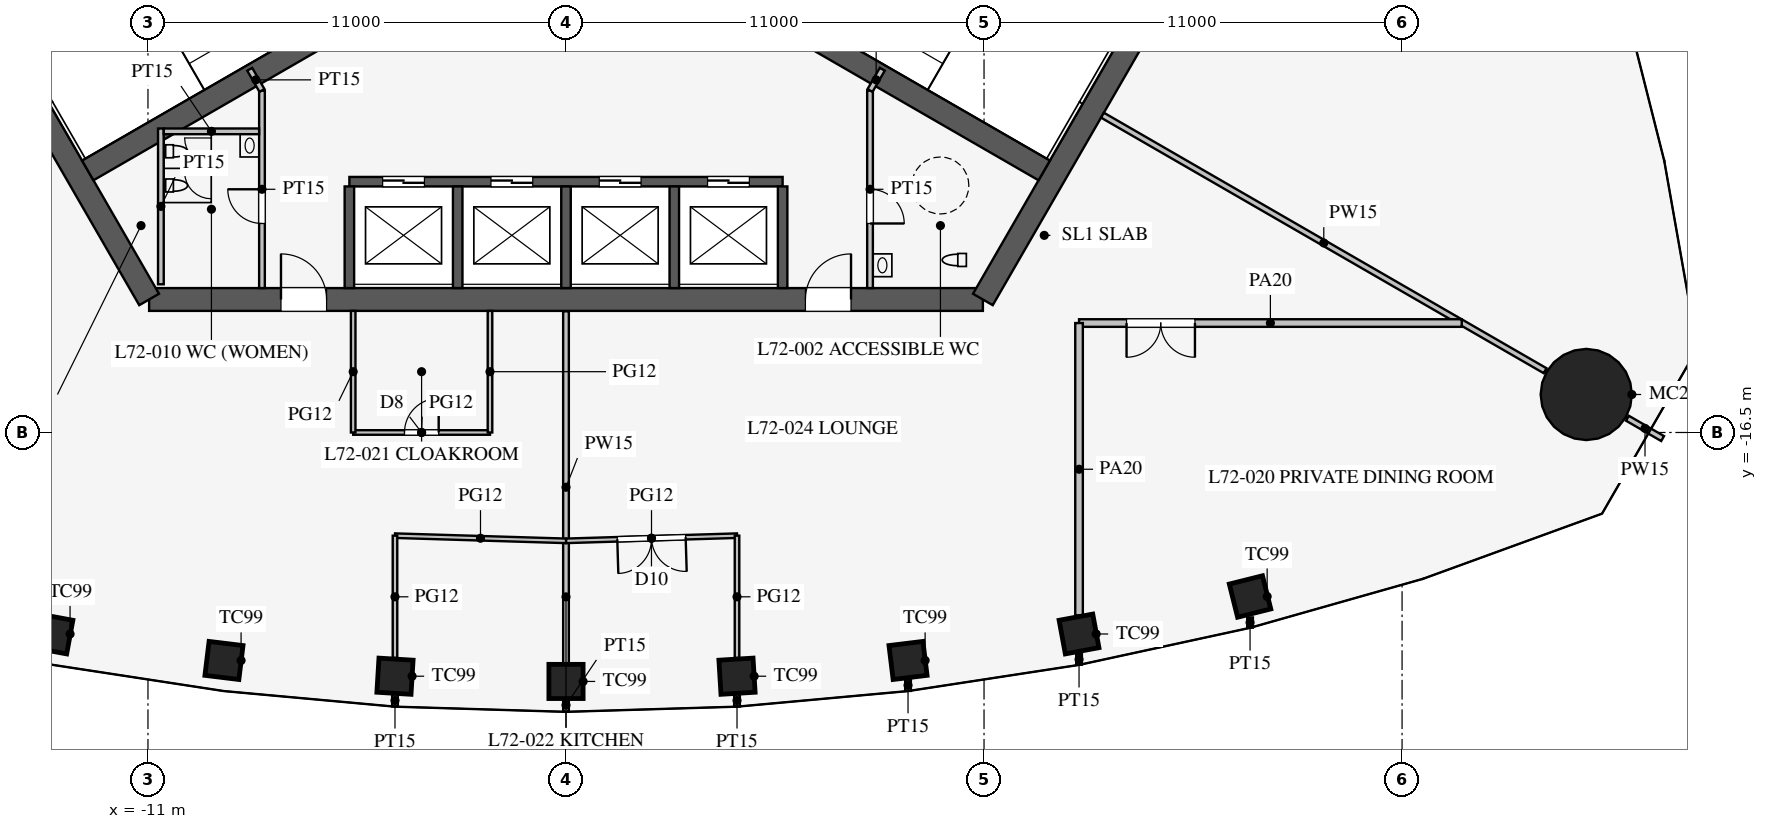
"""IFC4 building model, lengths in metres.
Left out: names, types, materials, properties, quantities, classifications, styles, units other than length and angle.
Written with IfcOpenShell. Run it as: python <this file> out.ifc"""

import sys

from ifc_helpers import new_model, si_unit, direction, frame, frame_2d, origin, origin_2d, place, context, subcontext, project, spatial, rectangle, circle, extrude, element, fill, save


model = new_model("IFC4")
c1 = context("Model", 3, precision=1e-05, world=origin(), true_north=direction((0.0, 1.0)))
c2 = subcontext(c1, "Body", "Model", "MODEL_VIEW")
j1 = project(units=[si_unit("LENGTHUNIT", "METRE"), si_unit("PLANEANGLEUNIT", "RADIAN")], contexts=[c1])
p1 = place(None, origin())
s1 = spatial("IfcSite", under=j1, at=p1, CompositionType="ELEMENT")
p2 = place(p1, origin())
s2 = spatial("IfcBuilding", under=s1, at=p2, CompositionType="ELEMENT")
p3 = place(p2, frame((0.0, 0.0, 314.1)))
s3 = spatial("IfcBuildingStorey", under=s2, at=p3, CompositionType="ELEMENT", Elevation=314.1)
for number, where, z_axis, x_axis in (
    (1, (-13.5, -21.803, 0.0), (0.0, 0.0, 1.0), (0.983, -0.182, 0.0)),
    (2, (-9.0, -22.499, 0.0), (0.0, 0.0, 1.0), (0.993, -0.121, 0.0)),
    (3, (-4.5, -22.914, 0.0), (0.0, 0.0, 1.0), (0.998, -0.061, 0.0)),
    (4, (0.0, -23.052, 0.0), (0.0, 0.0, 1.0), (1.0, 0.0, 0.0)),
    (5, (4.5, -22.914, 0.0), (0.0, 0.0, 1.0), (0.998, 0.061, 0.0)),
    (6, (9.0, -22.499, 0.0), (0.0, 0.0, 1.0), (0.993, 0.121, 0.0)),
    (7, (13.5, -21.803, 0.0), (0.0, 0.0, 1.0), (0.983, 0.182, 0.0)),
    (8, (18.0, -20.816, 0.0), (0.0, 0.0, 1.0), (0.97, 0.242, 0.0)),
):
    element("IfcColumn", number, at=place(p3, frame(where, z_axis=z_axis, x_axis=x_axis)), inside=s3, PredefinedType="COLUMN", context=c2, shape_type="SweptSolid", body=[
        extrude(rectangle(XDim=0.9, YDim=0.9, at=origin_2d()), origin(), (0.0, 0.0, 1.0), 4.2),
    ])
p4 = place(p3, frame((26.847, -15.5, 0.0), z_axis=(0.0, 0.0, 1.0), x_axis=(1.0, 0.0, 0.0)))
e9 = element("IfcColumn", 9, at=p4, inside=s3, PredefinedType="COLUMN", context=c2, shape_type="SweptSolid", body=[
    extrude(circle(Radius=1.2, at=origin_2d()), origin(), (0.0, 0.0, 1.0), 4.2),
])
p5 = place(p3, frame((-10.97, -13.0, 0.0), z_axis=(0.0, 0.0, 1.0), x_axis=(1.0, 0.0, 0.0)))
e10 = element("IfcWall", 10, at=p5, inside=s3, PredefinedType="SHEAR", context=c2, shape_type="SweptSolid", body=[
    extrude(rectangle(XDim=21.939, YDim=0.6, at=frame_2d((10.97, 0.0))), origin(), (0.0, 0.0, 1.0), 4.2),
])
p6 = place(p5, frame((17.27, 0.0, 0.0)))
e11 = element("IfcOpeningElement", 11, at=p6, cuts=e10, PredefinedType="OPENING", context=c2, shape_type="SweptSolid", body=[
    extrude(rectangle(XDim=1.2, YDim=2.1, at=frame_2d((0.6, 1.05))), frame((0.0, 0.31, 0.0), z_axis=(0.0, -1.0, 0.0), x_axis=(1.0, 0.0, 0.0)), (0.0, 0.0, 1.0), 0.62),
])
p7 = place(p5, frame((3.47, 0.0, 0.0)))
e12 = element("IfcOpeningElement", 12, at=p7, cuts=e10, PredefinedType="OPENING", context=c2, shape_type="SweptSolid", body=[
    extrude(rectangle(XDim=1.2, YDim=2.1, at=frame_2d((0.6, 1.05))), frame((0.0, 0.31, 0.0), z_axis=(0.0, -1.0, 0.0), x_axis=(1.0, 0.0, 0.0)), (0.0, 0.0, 1.0), 0.62),
])
for number, where, z_axis, x_axis in (
    (13, (10.97, -13.0, 0.0), (0.0, 0.0, 1.0), (0.5, 0.866, 0.0)),
    (14, (-16.743, -3.0, 0.0), (0.0, 0.0, 1.0), (0.5, -0.866, 0.0)),
):
    element("IfcWall", number, at=place(p3, frame(where, z_axis=z_axis, x_axis=x_axis)), inside=s3, PredefinedType="SHEAR", context=c2, shape_type="SweptSolid", body=[
        extrude(rectangle(XDim=11.547, YDim=0.6, at=frame_2d((5.773, 0.0))), origin(), (0.0, 0.0, 1.0), 4.2),
    ])
p8 = place(p3, frame((-5.7, -9.9, 0.0), z_axis=(0.0, 0.0, 1.0), x_axis=(1.0, 0.0, 0.0)))
e15 = element("IfcWall", 15, at=p8, inside=s3, PredefinedType="SHEAR", context=c2, shape_type="SweptSolid", body=[
    extrude(rectangle(XDim=11.4, YDim=0.25, at=frame_2d((5.7, 0.0))), origin(), (0.0, 0.0, 1.0), 4.2),
])
p9 = place(p8, frame((0.875, 0.0, 0.0)))
e16 = element("IfcOpeningElement", 16, at=p9, cuts=e15, PredefinedType="OPENING", context=c2, shape_type="SweptSolid", body=[
    extrude(rectangle(XDim=1.1, YDim=2.2, at=frame_2d((0.55, 1.1))), frame((0.0, 0.135, 0.0), z_axis=(0.0, -1.0, 0.0), x_axis=(1.0, 0.0, 0.0)), (0.0, 0.0, 1.0), 0.27),
])
p10 = place(p8, frame((3.725, 0.0, 0.0)))
e17 = element("IfcOpeningElement", 17, at=p10, cuts=e15, PredefinedType="OPENING", context=c2, shape_type="SweptSolid", body=[
    extrude(rectangle(XDim=1.1, YDim=2.2, at=frame_2d((0.55, 1.1))), frame((0.0, 0.135, 0.0), z_axis=(0.0, -1.0, 0.0), x_axis=(1.0, 0.0, 0.0)), (0.0, 0.0, 1.0), 0.27),
])
p11 = place(p8, frame((6.575, 0.0, 0.0)))
e18 = element("IfcOpeningElement", 18, at=p11, cuts=e15, PredefinedType="OPENING", context=c2, shape_type="SweptSolid", body=[
    extrude(rectangle(XDim=1.1, YDim=2.2, at=frame_2d((0.55, 1.1))), frame((0.0, 0.135, 0.0), z_axis=(0.0, -1.0, 0.0), x_axis=(1.0, 0.0, 0.0)), (0.0, 0.0, 1.0), 0.27),
])
p12 = place(p8, frame((9.425, 0.0, 0.0)))
e19 = element("IfcOpeningElement", 19, at=p12, cuts=e15, PredefinedType="OPENING", context=c2, shape_type="SweptSolid", body=[
    extrude(rectangle(XDim=1.1, YDim=2.2, at=frame_2d((0.55, 1.1))), frame((0.0, 0.135, 0.0), z_axis=(0.0, -1.0, 0.0), x_axis=(1.0, 0.0, 0.0)), (0.0, 0.0, 1.0), 0.27),
])
for number, where, z_axis, x_axis in (
    (20, (-5.7, -10.025, 0.0), (0.0, 0.0, 1.0), (0.0, -1.0, 0.0)),
    (21, (-2.85, -10.025, 0.0), (0.0, 0.0, 1.0), (0.0, -1.0, 0.0)),
    (22, (0.0, -10.025, 0.0), (0.0, 0.0, 1.0), (0.0, -1.0, 0.0)),
    (23, (2.85, -10.025, 0.0), (0.0, 0.0, 1.0), (0.0, -1.0, 0.0)),
    (24, (5.7, -10.025, 0.0), (0.0, 0.0, 1.0), (0.0, -1.0, 0.0)),
):
    element("IfcWall", number, at=place(p3, frame(where, z_axis=z_axis, x_axis=x_axis)), inside=s3, PredefinedType="SHEAR", context=c2, shape_type="SweptSolid", body=[
        extrude(rectangle(XDim=2.675, YDim=0.25, at=frame_2d((1.337, 0.0))), origin(), (0.0, 0.0, 1.0), 4.2),
    ])
for number, where, z_axis, x_axis in (
    (25, (4.638, -5.016, 0.0), (0.0, 0.0, 1.0), (0.866, -0.5, 0.0)),
    (26, (-4.638, -5.016, 0.0), (0.0, 0.0, 1.0), (-0.866, -0.5, 0.0)),
):
    element("IfcWall", number, at=place(p3, frame(where, z_axis=z_axis, x_axis=x_axis)), inside=s3, PredefinedType="SHEAR", context=c2, shape_type="SweptSolid", body=[
        extrude(rectangle(XDim=9.175, YDim=0.6, at=frame_2d((4.587, 0.0))), origin(), (0.0, 0.0, 1.0), 4.2),
    ])
p13 = place(p3, frame((8.0, -7.5, 0.0), z_axis=(0.0, 0.0, 1.0), x_axis=(0.0, -1.0, 0.0)))
e27 = element("IfcWall", 27, at=p13, inside=s3, PredefinedType="PARTITIONING", context=c2, shape_type="SweptSolid", body=[
    extrude(rectangle(XDim=5.2, YDim=0.15, at=frame_2d((2.6, 0.0))), origin(), (0.0, 0.0, 1.0), 4.0),
])
p14 = place(p13, frame((2.6, 0.0, 0.0)))
e28 = element("IfcOpeningElement", 28, at=p14, cuts=e27, PredefinedType="OPENING", context=c2, shape_type="SweptSolid", body=[
    extrude(rectangle(XDim=0.9, YDim=2.1, at=frame_2d((0.45, 1.05))), frame((0.0, 0.085, 0.0), z_axis=(0.0, -1.0, 0.0), x_axis=(1.0, 0.0, 0.0)), (0.0, 0.0, 1.0), 0.17),
])
p15 = place(p3, frame((-8.0, -7.5, 0.0), z_axis=(0.0, 0.0, 1.0), x_axis=(0.0, -1.0, 0.0)))
e29 = element("IfcWall", 29, at=p15, inside=s3, PredefinedType="PARTITIONING", context=c2, shape_type="SweptSolid", body=[
    extrude(rectangle(XDim=5.2, YDim=0.15, at=frame_2d((2.6, 0.0))), origin(), (0.0, 0.0, 1.0), 4.0),
])
p16 = place(p15, frame((2.6, 0.0, 0.0)))
e30 = element("IfcOpeningElement", 30, at=p16, cuts=e29, PredefinedType="OPENING", context=c2, shape_type="SweptSolid", body=[
    extrude(rectangle(XDim=0.9, YDim=2.1, at=frame_2d((0.45, 1.05))), frame((0.0, 0.085, 0.0), z_axis=(0.0, -1.0, 0.0), x_axis=(1.0, 0.0, 0.0)), (0.0, 0.0, 1.0), 0.17),
])
for number, where, z_axis, x_axis in (
    (31, (8.0, -7.5, 0.0), (0.0, 0.0, 1.0), (0.5, 0.866, 0.0)),
    (32, (-8.0, -7.5, 0.0), (0.0, 0.0, 1.0), (-0.5, 0.866, 0.0)),
):
    element("IfcWall", number, at=place(p3, frame(where, z_axis=z_axis, x_axis=x_axis)), inside=s3, PredefinedType="PARTITIONING", context=c2, shape_type="SweptSolid", body=[
        extrude(rectangle(XDim=0.645, YDim=0.15, at=frame_2d((0.323, 0.0))), origin(), (0.0, 0.0, 1.0), 4.0),
    ])
p17 = place(p3, frame((-10.66, -8.5, 0.0), z_axis=(0.0, 0.0, 1.0), x_axis=(0.0, -1.0, 0.0)))
e33 = element("IfcWall", 33, at=p17, inside=s3, PredefinedType="PARTITIONING", context=c2, shape_type="SweptSolid", body=[
    extrude(rectangle(XDim=4.1, YDim=0.15, at=frame_2d((2.05, 0.0))), origin(), (0.0, 0.0, 1.0), 4.0),
])
p18 = place(p3, frame((-8.075, -8.575, 0.0), z_axis=(0.0, 0.0, 1.0), x_axis=(-1.0, 0.0, 0.0)))
e34 = element("IfcWall", 34, at=p18, inside=s3, PredefinedType="PARTITIONING", context=c2, shape_type="SweptSolid", body=[
    extrude(rectangle(XDim=2.51, YDim=0.15, at=frame_2d((1.255, 0.0))), origin(), (0.0, 0.0, 1.0), 4.0),
])
p19 = place(p3, frame((14.116, -8.15, 0.0), z_axis=(0.0, 0.0, 1.0), x_axis=(0.866020541135, -0.500008422262, 0.0)))
e35 = element("IfcWall", 35, at=p19, inside=s3, PredefinedType="PARTITIONING", context=c2, shape_type="SweptSolid", body=[
    extrude(rectangle(XDim=13.45, YDim=0.15, at=frame_2d((6.725, 0.0))), origin(), (0.0, 0.0, 1.0), 2.5),
])
p20 = place(p3, frame((27.929, -16.125, 0.0), z_axis=(0.0, 0.0, 1.0), x_axis=(0.866086810508, -0.499893625349, 0.0)))
e36 = element("IfcWall", 36, at=p20, inside=s3, PredefinedType="PARTITIONING", context=c2, shape_type="SweptSolid", body=[
    extrude(rectangle(XDim=1.07, YDim=0.15, at=frame_2d((0.535, 0.0))), origin(), (0.0, 0.0, 1.0), 2.5),
])
p21 = place(p3, frame((13.5, -13.62, 0.0), z_axis=(0.0, 0.0, 1.0), x_axis=(1.0, 0.0, 0.0)))
e37 = element("IfcWall", 37, at=p21, inside=s3, PredefinedType="PARTITIONING", context=c2, shape_type="SweptSolid", body=[
    extrude(rectangle(XDim=10.07, YDim=0.2, at=frame_2d((5.035, 0.0))), origin(), (0.0, 0.0, 1.0), 2.9),
])
p22 = place(p21, frame((1.25, 0.0, 0.15)))
e38 = element("IfcOpeningElement", 38, at=p22, cuts=e37, PredefinedType="OPENING", context=c2, shape_type="SweptSolid", body=[
    extrude(rectangle(XDim=1.8, YDim=2.1, at=frame_2d((0.9, 1.05))), frame((0.0, 0.11, 0.0), z_axis=(0.0, -1.0, 0.0), x_axis=(1.0, 0.0, 0.0)), (0.0, 0.0, 1.0), 0.22),
])
p23 = place(p3, frame((0.0, -13.31, 0.0), z_axis=(0.0, 0.0, 1.0), x_axis=(0.0, -1.0, 0.0)))
e39 = element("IfcWall", 39, at=p23, inside=s3, PredefinedType="PARTITIONING", context=c2, shape_type="SweptSolid", body=[
    extrude(rectangle(XDim=9.261, YDim=0.15, at=frame_2d((4.631, 0.0))), origin(), (0.0, 0.0, 1.0), 3.3),
])
p24 = place(p3, frame((-5.6, -16.5, 0.0), z_axis=(0.0, 0.0, 1.0), x_axis=(1.0, 0.0, 0.0)))
e40 = element("IfcWall", 40, at=p24, inside=s3, PredefinedType="PARTITIONING", context=c2, shape_type="SweptSolid", body=[
    extrude(rectangle(XDim=3.6, YDim=0.12, at=frame_2d((1.8, 0.0))), origin(), (0.0, 0.0, 1.0), 2.9),
])
p25 = place(p24, frame((1.35, 0.0, 0.15)))
e41 = element("IfcOpeningElement", 41, at=p25, cuts=e40, PredefinedType="OPENING", context=c2, shape_type="SweptSolid", body=[
    extrude(rectangle(XDim=0.9, YDim=2.1, at=frame_2d((0.45, 1.05))), frame((0.0, 0.07, 0.0), z_axis=(0.0, -1.0, 0.0), x_axis=(1.0, 0.0, 0.0)), (0.0, 0.0, 1.0), 0.14),
])
for number, where, z_axis, x_axis in (
    (42, (-2.0, -13.3, 0.0), (0.0, 0.0, 1.0), (0.0, -1.0, 0.0)),
    (43, (-5.6, -13.3, 0.0), (0.0, 0.0, 1.0), (0.0, -1.0, 0.0)),
):
    element("IfcWall", number, at=place(p3, frame(where, z_axis=z_axis, x_axis=x_axis)), inside=s3, PredefinedType="PARTITIONING", context=c2, shape_type="SweptSolid", body=[
        extrude(rectangle(XDim=3.2, YDim=0.12, at=frame_2d((1.6, 0.0))), origin(), (0.0, 0.0, 1.0), 2.9),
    ])
p26 = place(p3, frame((13.5, -22.331, 0.0), z_axis=(0.0, 0.0, 1.0), x_axis=(0.0, -1.0, 0.0)))
e44 = element("IfcWall", 44, at=p26, inside=s3, PredefinedType="PARTITIONING", context=c2, shape_type="SweptSolid", body=[
    extrude(rectangle(XDim=0.28, YDim=0.15, at=frame_2d((0.14, 0.0))), origin(), (0.0, 0.0, 1.0), 2.9),
])
p27 = place(p3, frame((18.0, -21.366, 0.0), z_axis=(0.0, 0.0, 1.0), x_axis=(0.0, -1.0, 0.0)))
e45 = element("IfcWall", 45, at=p27, inside=s3, PredefinedType="PARTITIONING", context=c2, shape_type="SweptSolid", body=[
    extrude(rectangle(XDim=0.27, YDim=0.15, at=frame_2d((0.135, 0.0))), origin(), (0.0, 0.0, 1.0), 2.9),
])
p28 = place(p3, frame((4.5, -23.394, 0.0), z_axis=(0.0, 0.0, 1.0), x_axis=(0.0, -1.0, 0.0)))
e46 = element("IfcWall", 46, at=p28, inside=s3, PredefinedType="PARTITIONING", context=c2, shape_type="SweptSolid", body=[
    extrude(rectangle(XDim=0.316, YDim=0.15, at=frame_2d((0.158, 0.0))), origin(), (0.0, 0.0, 1.0), 2.9),
])
p29 = place(p3, frame((9.0, -23.004, 0.0), z_axis=(0.0, 0.0, 1.0), x_axis=(0.0, -1.0, 0.0)))
e47 = element("IfcWall", 47, at=p29, inside=s3, PredefinedType="PARTITIONING", context=c2, shape_type="SweptSolid", body=[
    extrude(rectangle(XDim=0.296, YDim=0.15, at=frame_2d((0.148, 0.0))), origin(), (0.0, 0.0, 1.0), 2.9),
])
p30 = place(p3, frame((0.0, -23.506, 0.0), z_axis=(0.0, 0.0, 1.0), x_axis=(0.0, -1.0, 0.0)))
e48 = element("IfcWall", 48, at=p30, inside=s3, PredefinedType="PARTITIONING", context=c2, shape_type="SweptSolid", body=[
    extrude(rectangle(XDim=0.341, YDim=0.15, at=frame_2d((0.17, 0.0))), origin(), (0.0, 0.0, 1.0), 2.9),
])
p31 = place(p3, frame((-4.5, -23.394, 0.0), z_axis=(0.0, 0.0, 1.0), x_axis=(0.0, -1.0, 0.0)))
e49 = element("IfcWall", 49, at=p31, inside=s3, PredefinedType="PARTITIONING", context=c2, shape_type="SweptSolid", body=[
    extrude(rectangle(XDim=0.316, YDim=0.15, at=frame_2d((0.158, 0.0))), origin(), (0.0, 0.0, 1.0), 2.9),
])
p32 = place(p3, frame((0.0, -19.352, 0.0), z_axis=(0.0, 0.0, 1.0), x_axis=(0.999542074227, 0.030259574513, 0.0)))
e50 = element("IfcWall", 50, at=p32, inside=s3, PredefinedType="PARTITIONING", context=c2, shape_type="SweptSolid", body=[
    extrude(rectangle(XDim=4.502, YDim=0.12, at=frame_2d((2.251, 0.0))), origin(), (0.0, 0.0, 1.0), 2.9),
])
p33 = place(p32, frame((1.35, 0.0, 0.15)))
e51 = element("IfcOpeningElement", 51, at=p33, cuts=e50, PredefinedType="OPENING", context=c2, shape_type="SweptSolid", body=[
    extrude(rectangle(XDim=1.8, YDim=2.1, at=frame_2d((0.9, 1.05))), frame((0.0, 0.07, 0.0), z_axis=(0.0, -1.0, 0.0), x_axis=(1.0, 0.0, 0.0)), (0.0, 0.0, 1.0), 0.14),
])
p34 = place(p3, frame((-4.5, -19.215, 0.0), z_axis=(0.0, 0.0, 1.0), x_axis=(0.999542074227, -0.030259574513, 0.0)))
e52 = element("IfcWall", 52, at=p34, inside=s3, PredefinedType="PARTITIONING", context=c2, shape_type="SweptSolid", body=[
    extrude(rectangle(XDim=4.502, YDim=0.12, at=frame_2d((2.251, 0.0))), origin(), (0.0, 0.0, 1.0), 2.9),
])
p35 = place(p3, frame((13.5, -13.62, 0.0), z_axis=(0.0, 0.0, 1.0), x_axis=(0.0, -1.0, 0.0)))
e53 = element("IfcWall", 53, at=p35, inside=s3, PredefinedType="PARTITIONING", context=c2, shape_type="SweptSolid", body=[
    extrude(rectangle(XDim=7.695, YDim=0.2, at=frame_2d((3.847, 0.0))), origin(), (0.0, 0.0, 1.0), 2.9),
])
for number, where, z_axis, x_axis in (
    (54, (4.5, -19.215, 0.0), (0.0, 0.0, 1.0), (0.0, -1.0, 0.0)),
    (55, (-4.5, -19.215, 0.0), (0.0, 0.0, 1.0), (0.0, -1.0, 0.0)),
):
    element("IfcWall", number, at=place(p3, frame(where, z_axis=z_axis, x_axis=x_axis)), inside=s3, PredefinedType="PARTITIONING", context=c2, shape_type="SweptSolid", body=[
        extrude(rectangle(XDim=3.218, YDim=0.12, at=frame_2d((1.609, 0.0))), origin(), (0.0, 0.0, 1.0), 2.9),
    ])
p36 = place(p14, origin())
e56 = element("IfcDoor", 56, at=p36, inside=s3, OperationType="SINGLE_SWING_RIGHT", PredefinedType="DOOR", context=c2, shape_type="SweptSolid", body=[
    extrude(rectangle(XDim=0.9, YDim=2.1, at=frame_2d((0.45, 1.05))), frame((0.0, 0.025, 0.0), z_axis=(0.0, -1.0, 0.0), x_axis=(1.0, 0.0, 0.0)), (0.0, 0.0, 1.0), 0.05),
])
fill(e28, e56)
p37 = place(p16, frame((0.9, 0.0, 0.0), z_axis=(0.0, 0.0, 1.0), x_axis=(-1.0, 0.0, 0.0)))
e57 = element("IfcDoor", 57, at=p37, inside=s3, OperationType="SINGLE_SWING_RIGHT", PredefinedType="DOOR", context=c2, shape_type="SweptSolid", body=[
    extrude(rectangle(XDim=0.9, YDim=2.1, at=frame_2d((0.45, 1.05))), frame((0.0, 0.025, 0.0), z_axis=(0.0, -1.0, 0.0), x_axis=(1.0, 0.0, 0.0)), (0.0, 0.0, 1.0), 0.05),
])
fill(e30, e57)
p38 = place(p6, origin())
e58 = element("IfcDoor", 58, at=p38, inside=s3, OperationType="SINGLE_SWING_RIGHT", PredefinedType="DOOR", context=c2, shape_type="SweptSolid", body=[
    extrude(rectangle(XDim=1.2, YDim=2.1, at=frame_2d((0.6, 1.05))), frame((0.0, 0.025, 0.0), z_axis=(0.0, -1.0, 0.0), x_axis=(1.0, 0.0, 0.0)), (0.0, 0.0, 1.0), 0.05),
])
fill(e11, e58)
p39 = place(p7, origin())
e59 = element("IfcDoor", 59, at=p39, inside=s3, OperationType="SINGLE_SWING_LEFT", PredefinedType="DOOR", context=c2, shape_type="SweptSolid", body=[
    extrude(rectangle(XDim=1.2, YDim=2.1, at=frame_2d((0.6, 1.05))), frame((0.0, 0.025, 0.0), z_axis=(0.0, -1.0, 0.0), x_axis=(1.0, 0.0, 0.0)), (0.0, 0.0, 1.0), 0.05),
])
fill(e12, e59)
p40 = place(p22, frame((1.8, 0.0, 0.0), z_axis=(0.0, 0.0, 1.0), x_axis=(-1.0, 0.0, 0.0)))
e60 = element("IfcDoor", 60, at=p40, inside=s3, OperationType="DOUBLE_DOOR_SINGLE_SWING", PredefinedType="DOOR", context=c2, shape_type="SweptSolid", body=[
    extrude(rectangle(XDim=1.8, YDim=2.1, at=frame_2d((0.9, 1.05))), frame((0.0, 0.025, 0.0), z_axis=(0.0, -1.0, 0.0), x_axis=(1.0, 0.0, 0.0)), (0.0, 0.0, 1.0), 0.05),
])
fill(e38, e60)
p41 = place(p25, origin())
e61 = element("IfcDoor", 61, at=p41, inside=s3, OperationType="SINGLE_SWING_RIGHT", PredefinedType="DOOR", context=c2, shape_type="SweptSolid", body=[
    extrude(rectangle(XDim=0.9, YDim=2.1, at=frame_2d((0.45, 1.05))), frame((0.0, 0.025, 0.0), z_axis=(0.0, -1.0, 0.0), x_axis=(1.0, 0.0, 0.0)), (0.0, 0.0, 1.0), 0.05),
])
fill(e41, e61)
p42 = place(p33, frame((1.8, 0.0, 0.0), z_axis=(0.0, 0.0, 1.0), x_axis=(-1.0, 0.0, 0.0)))
e62 = element("IfcDoor", 62, at=p42, inside=s3, OperationType="DOUBLE_DOOR_SINGLE_SWING", PredefinedType="DOOR", context=c2, shape_type="SweptSolid", body=[
    extrude(rectangle(XDim=1.8, YDim=2.1, at=frame_2d((0.9, 1.05))), frame((0.0, 0.025, 0.0), z_axis=(0.0, -1.0, 0.0), x_axis=(1.0, 0.0, 0.0)), (0.0, 0.0, 1.0), 0.05),
])
fill(e51, e62)
p43 = place(p9, origin())
e63 = element("IfcDoor", 63, at=p43, inside=s3, OperationType="DOUBLE_DOOR_SLIDING", PredefinedType="DOOR", context=c2, shape_type="SweptSolid", body=[
    extrude(rectangle(XDim=1.1, YDim=2.2, at=frame_2d((0.55, 1.1))), frame((0.0, 0.025, 0.0), z_axis=(0.0, -1.0, 0.0), x_axis=(1.0, 0.0, 0.0)), (0.0, 0.0, 1.0), 0.05),
])
fill(e16, e63)
p44 = place(p10, origin())
e64 = element("IfcDoor", 64, at=p44, inside=s3, OperationType="DOUBLE_DOOR_SLIDING", PredefinedType="DOOR", context=c2, shape_type="SweptSolid", body=[
    extrude(rectangle(XDim=1.1, YDim=2.2, at=frame_2d((0.55, 1.1))), frame((0.0, 0.025, 0.0), z_axis=(0.0, -1.0, 0.0), x_axis=(1.0, 0.0, 0.0)), (0.0, 0.0, 1.0), 0.05),
])
fill(e17, e64)
p45 = place(p11, origin())
e65 = element("IfcDoor", 65, at=p45, inside=s3, OperationType="DOUBLE_DOOR_SLIDING", PredefinedType="DOOR", context=c2, shape_type="SweptSolid", body=[
    extrude(rectangle(XDim=1.1, YDim=2.2, at=frame_2d((0.55, 1.1))), frame((0.0, 0.025, 0.0), z_axis=(0.0, -1.0, 0.0), x_axis=(1.0, 0.0, 0.0)), (0.0, 0.0, 1.0), 0.05),
])
fill(e18, e65)
p46 = place(p12, origin())
e66 = element("IfcDoor", 66, at=p46, inside=s3, OperationType="DOUBLE_DOOR_SLIDING", PredefinedType="DOOR", context=c2, shape_type="SweptSolid", body=[
    extrude(rectangle(XDim=1.1, YDim=2.2, at=frame_2d((0.55, 1.1))), frame((0.0, 0.025, 0.0), z_axis=(0.0, -1.0, 0.0), x_axis=(1.0, 0.0, 0.0)), (0.0, 0.0, 1.0), 0.05),
])
fill(e19, e66)
save(model, sys.argv[1])
